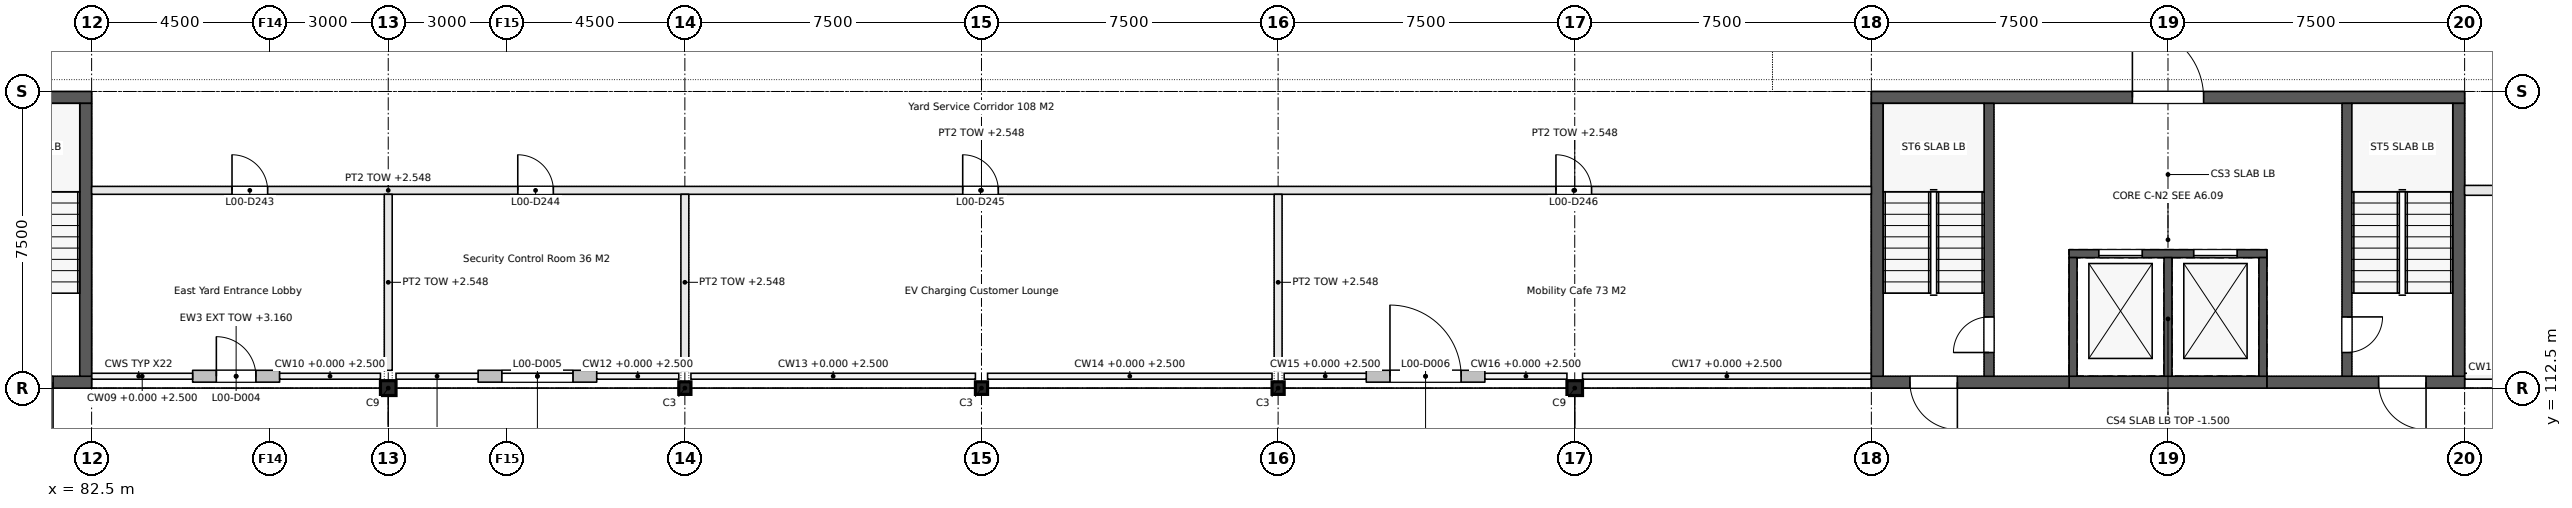
"""IFC4 building model, lengths in metres.
Left out: names, types, materials, properties, quantities, classifications, styles, units other than length and angle.
Written with IfcOpenShell. Run it as: python <this file> out.ifc"""

import sys

from ifc_helpers import new_model, si_unit, direction, frame, frame_2d, origin, origin_2d, place, context, subcontext, project, spatial, rectangle, i_section, extrude, element, fill, save


model = new_model("IFC4")
c1 = context("Model", 3, precision=1e-05, world=origin(), true_north=direction((0.0, 1.0)))
c2 = subcontext(c1, "Body", "Model", "MODEL_VIEW")
j1 = project(units=[si_unit("LENGTHUNIT", "METRE"), si_unit("PLANEANGLEUNIT", "RADIAN")], contexts=[c1])
p1 = place(None, origin())
s1 = spatial("IfcSite", under=j1, at=p1, CompositionType="ELEMENT")
p2 = place(p1, origin())
s2 = spatial("IfcBuilding", under=s1, at=p2, CompositionType="ELEMENT")
p3 = place(p2, origin())
s3 = spatial("IfcBuildingStorey", under=s2, at=p3, CompositionType="ELEMENT", Elevation=0.0)
p4 = place(p3, frame((90.0, 112.5, -0.25), z_axis=(0.0, 0.0, 1.0), x_axis=(1.0, 0.0, 0.0)))
e1 = element("IfcColumn", 1, at=p4, inside=s3, PredefinedType="COLUMN", context=c2, shape_type="SweptSolid", body=[
    extrude(i_section(OverallWidth=0.394, OverallDepth=0.376, WebThickness=0.017, FlangeThickness=0.028, FilletRadius=0.015, at=origin_2d()), origin(), (0.0, 0.0, 1.0), 3.55),
])
for number, where, z_axis, x_axis in (
    (2, (97.5, 112.5, -0.25), (0.0, 0.0, 1.0), (1.0, 0.0, 0.0)),
    (3, (105.0, 112.5, -0.25), (0.0, 0.0, 1.0), (1.0, 0.0, 0.0)),
    (4, (112.5, 112.5, -0.25), (0.0, 0.0, 1.0), (1.0, 0.0, 0.0)),
):
    element("IfcColumn", number, at=place(p3, frame(where, z_axis=z_axis, x_axis=x_axis)), inside=s3, PredefinedType="COLUMN", context=c2, shape_type="SweptSolid", body=[
        extrude(i_section(OverallWidth=0.307, OverallDepth=0.318, WebThickness=0.013, FlangeThickness=0.021, FilletRadius=0.015, at=origin_2d()), origin(), (0.0, 0.0, 1.0), 3.55),
    ])
p5 = place(p3, frame((120.0, 112.5, -0.25), z_axis=(0.0, 0.0, 1.0), x_axis=(1.0, 0.0, 0.0)))
e5 = element("IfcColumn", 5, at=p5, inside=s3, PredefinedType="COLUMN", context=c2, shape_type="SweptSolid", body=[
    extrude(i_section(OverallWidth=0.394, OverallDepth=0.376, WebThickness=0.017, FlangeThickness=0.028, FilletRadius=0.015, at=origin_2d()), origin(), (0.0, 0.0, 1.0), 3.55),
])
p6 = place(p3, frame((82.5, 117.5, 0.0), z_axis=(0.0, 0.0, 1.0), x_axis=(1.0, 0.0, 0.0)))
e6 = element("IfcWall", 6, at=p6, inside=s3, PredefinedType="PARTITIONING", context=c2, shape_type="SweptSolid", body=[
    extrude(rectangle(XDim=45.0, YDim=0.2, at=frame_2d((22.5, 0.0))), origin(), (0.0, 0.0, 1.0), 2.548),
])
p7 = place(p6, frame((3.55, 0.0, 0.0)))
e7 = element("IfcOpeningElement", 7, at=p7, cuts=e6, PredefinedType="OPENING", context=c2, shape_type="SweptSolid", body=[
    extrude(rectangle(XDim=0.9, YDim=2.1, at=frame_2d((0.45, 1.05))), frame((0.0, 0.11, 0.0), z_axis=(0.0, -1.0, 0.0), x_axis=(1.0, 0.0, 0.0)), (0.0, 0.0, 1.0), 0.22),
])
p8 = place(p6, frame((10.775, 0.0, 0.0)))
e8 = element("IfcOpeningElement", 8, at=p8, cuts=e6, PredefinedType="OPENING", context=c2, shape_type="SweptSolid", body=[
    extrude(rectangle(XDim=0.9, YDim=2.1, at=frame_2d((0.45, 1.05))), frame((0.0, 0.11, 0.0), z_axis=(0.0, -1.0, 0.0), x_axis=(1.0, 0.0, 0.0)), (0.0, 0.0, 1.0), 0.22),
])
p9 = place(p6, frame((22.025, 0.0, 0.0)))
e9 = element("IfcOpeningElement", 9, at=p9, cuts=e6, PredefinedType="OPENING", context=c2, shape_type="SweptSolid", body=[
    extrude(rectangle(XDim=0.9, YDim=2.1, at=frame_2d((0.45, 1.05))), frame((0.0, 0.11, 0.0), z_axis=(0.0, -1.0, 0.0), x_axis=(1.0, 0.0, 0.0)), (0.0, 0.0, 1.0), 0.22),
])
p10 = place(p6, frame((37.025, 0.0, 0.0)))
e10 = element("IfcOpeningElement", 10, at=p10, cuts=e6, PredefinedType="OPENING", context=c2, shape_type="SweptSolid", body=[
    extrude(rectangle(XDim=0.9, YDim=2.1, at=frame_2d((0.45, 1.05))), frame((0.0, 0.11, 0.0), z_axis=(0.0, -1.0, 0.0), x_axis=(1.0, 0.0, 0.0)), (0.0, 0.0, 1.0), 0.22),
])
p11 = place(p3, frame((142.5, 117.5, 0.0), z_axis=(0.0, 0.0, 1.0), x_axis=(1.0, 0.0, 0.0)))
e11 = element("IfcWall", 11, at=p11, inside=s3, PredefinedType="PARTITIONING", context=c2, shape_type="SweptSolid", body=[
    extrude(rectangle(XDim=7.5, YDim=0.25, at=frame_2d((3.75, 0.0))), origin(), (0.0, 0.0, 1.0), 2.548),
])
p12 = place(p11, frame((3.3, 0.0, 0.0)))
e12 = element("IfcOpeningElement", 12, at=p12, cuts=e11, PredefinedType="OPENING", context=c2, shape_type="SweptSolid", body=[
    extrude(rectangle(XDim=0.9, YDim=2.1, at=frame_2d((0.45, 1.05))), frame((0.0, 0.135, 0.0), z_axis=(0.0, -1.0, 0.0), x_axis=(1.0, 0.0, 0.0)), (0.0, 0.0, 1.0), 0.27),
])
for number, where, z_axis, x_axis in (
    (13, (90.0, 112.95, 0.0), (0.0, 0.0, 1.0), (0.0, 1.0, 0.0)),
    (14, (97.5, 112.95, 0.0), (0.0, 0.0, 1.0), (0.0, 1.0, 0.0)),
    (15, (112.5, 112.95, 0.0), (0.0, 0.0, 1.0), (0.0, 1.0, 0.0)),
):
    element("IfcWall", number, at=place(p3, frame(where, z_axis=z_axis, x_axis=x_axis)), inside=s3, PredefinedType="PARTITIONING", context=c2, shape_type="SweptSolid", body=[
        extrude(rectangle(XDim=4.45, YDim=0.2, at=frame_2d((2.225, 0.0))), origin(), (0.0, 0.0, 1.0), 2.548),
    ])
p13 = place(p3, frame((85.054, 112.8, 0.0), z_axis=(0.0, 0.0, 1.0), x_axis=(1.0, 0.0, 0.0)))
e16 = element("IfcWall", 16, at=p13, inside=s3, PredefinedType="SOLIDWALL", context=c2, shape_type="SweptSolid", body=[
    extrude(rectangle(XDim=2.2, YDim=0.3, at=frame_2d((1.1, 0.0))), origin(), (0.0, 0.0, 1.0), 3.16),
])
p14 = place(p13, frame((0.6, 0.0, 0.0)))
e17 = element("IfcOpeningElement", 17, at=p14, cuts=e16, PredefinedType="OPENING", context=c2, shape_type="SweptSolid", body=[
    extrude(rectangle(XDim=1.0, YDim=2.1, at=frame_2d((0.5, 1.05))), frame((0.0, 0.16, 0.0), z_axis=(0.0, -1.0, 0.0), x_axis=(1.0, 0.0, 0.0)), (0.0, 0.0, 1.0), 0.32),
])
p15 = place(p3, frame((92.272, 112.8, 0.0), z_axis=(0.0, 0.0, 1.0), x_axis=(1.0, 0.0, 0.0)))
e18 = element("IfcWall", 18, at=p15, inside=s3, PredefinedType="SOLIDWALL", context=c2, shape_type="SweptSolid", body=[
    extrude(rectangle(XDim=3.0, YDim=0.3, at=frame_2d((1.5, 0.0))), origin(), (0.0, 0.0, 1.0), 3.16),
])
p16 = place(p15, frame((0.6, 0.0, 0.0)))
e19 = element("IfcOpeningElement", 19, at=p16, cuts=e18, PredefinedType="OPENING", context=c2, shape_type="SweptSolid", body=[
    extrude(rectangle(XDim=1.8, YDim=2.4, at=frame_2d((0.9, 1.2))), frame((0.0, 0.16, 0.0), z_axis=(0.0, -1.0, 0.0), x_axis=(1.0, 0.0, 0.0)), (0.0, 0.0, 1.0), 0.32),
])
p17 = place(p3, frame((114.728, 112.8, 0.0), z_axis=(0.0, 0.0, 1.0), x_axis=(1.0, 0.0, 0.0)))
e20 = element("IfcWall", 20, at=p17, inside=s3, PredefinedType="SOLIDWALL", context=c2, shape_type="SweptSolid", body=[
    extrude(rectangle(XDim=3.0, YDim=0.3, at=frame_2d((1.5, 0.0))), origin(), (0.0, 0.0, 1.0), 3.16),
])
p18 = place(p17, frame((0.6, 0.0, 0.0)))
e21 = element("IfcOpeningElement", 21, at=p18, cuts=e20, PredefinedType="OPENING", context=c2, shape_type="SweptSolid", body=[
    extrude(rectangle(XDim=1.8, YDim=2.4, at=frame_2d((0.9, 1.2))), frame((0.0, 0.16, 0.0), z_axis=(0.0, -1.0, 0.0), x_axis=(1.0, 0.0, 0.0)), (0.0, 0.0, 1.0), 0.32),
])
p19 = place(p3, frame((67.5, 119.85, 0.0), z_axis=(0.0, 0.0, 1.0), x_axis=(1.0, 0.0, 0.0)))
e22 = element("IfcWall", 22, at=p19, inside=s3, PredefinedType="SHEAR", context=c2, shape_type="SweptSolid", body=[
    extrude(rectangle(XDim=15.0, YDim=0.3, at=frame_2d((7.5, 0.0))), origin(), (0.0, 0.0, 1.0), 3.3),
])
p20 = place(p19, frame((6.6, 0.0, 0.0)))
e23 = element("IfcOpeningElement", 23, at=p20, cuts=e22, PredefinedType="OPENING", context=c2, shape_type="SweptSolid", body=[
    extrude(rectangle(XDim=1.8, YDim=2.1, at=frame_2d((0.9, 1.05))), frame((0.0, 0.16, 0.0), z_axis=(0.0, -1.0, 0.0), x_axis=(1.0, 0.0, 0.0)), (0.0, 0.0, 1.0), 0.32),
])
p21 = place(p3, frame((82.5, 112.65, 0.0), z_axis=(0.0, 0.0, 1.0), x_axis=(-1.0, 0.0, 0.0)))
e24 = element("IfcWall", 24, at=p21, inside=s3, PredefinedType="SHEAR", context=c2, shape_type="SweptSolid", body=[
    extrude(rectangle(XDim=5.0, YDim=0.3, at=frame_2d((2.5, 0.0))), origin(), (0.0, 0.0, 1.0), 3.3),
])
p22 = place(p21, frame((0.975, 0.0, 0.0)))
e25 = element("IfcOpeningElement", 25, at=p22, cuts=e24, PredefinedType="OPENING", context=c2, shape_type="SweptSolid", body=[
    extrude(rectangle(XDim=1.2, YDim=2.1, at=frame_2d((0.6, 1.05))), frame((0.0, 0.16, 0.0), z_axis=(0.0, -1.0, 0.0), x_axis=(1.0, 0.0, 0.0)), (0.0, 0.0, 1.0), 0.32),
])
p23 = place(p3, frame((82.35, 119.7, 0.0), z_axis=(0.0, 0.0, 1.0), x_axis=(0.0, -1.0, 0.0)))
e26 = element("IfcWall", 26, at=p23, inside=s3, PredefinedType="SHEAR", context=c2, shape_type="SweptSolid", body=[
    extrude(rectangle(XDim=6.9, YDim=0.3, at=frame_2d((3.45, 0.0))), origin(), (0.0, 0.0, 1.0), 3.3),
])
p24 = place(p3, frame((127.5, 119.85, 0.0), z_axis=(0.0, 0.0, 1.0), x_axis=(1.0, 0.0, 0.0)))
e27 = element("IfcWall", 27, at=p24, inside=s3, PredefinedType="SHEAR", context=c2, shape_type="SweptSolid", body=[
    extrude(rectangle(XDim=15.0, YDim=0.3, at=frame_2d((7.5, 0.0))), origin(), (0.0, 0.0, 1.0), 3.3),
])
p25 = place(p24, frame((6.6, 0.0, 0.0)))
e28 = element("IfcOpeningElement", 28, at=p25, cuts=e27, PredefinedType="OPENING", context=c2, shape_type="SweptSolid", body=[
    extrude(rectangle(XDim=1.8, YDim=2.1, at=frame_2d((0.9, 1.05))), frame((0.0, 0.16, 0.0), z_axis=(0.0, -1.0, 0.0), x_axis=(1.0, 0.0, 0.0)), (0.0, 0.0, 1.0), 0.32),
])
p26 = place(p3, frame((142.5, 112.65, 0.0), z_axis=(0.0, 0.0, 1.0), x_axis=(-1.0, 0.0, 0.0)))
e29 = element("IfcWall", 29, at=p26, inside=s3, PredefinedType="SHEAR", context=c2, shape_type="SweptSolid", body=[
    extrude(rectangle(XDim=5.0, YDim=0.3, at=frame_2d((2.5, 0.0))), origin(), (0.0, 0.0, 1.0), 3.3),
])
p27 = place(p26, frame((0.975, 0.0, 0.0)))
e30 = element("IfcOpeningElement", 30, at=p27, cuts=e29, PredefinedType="OPENING", context=c2, shape_type="SweptSolid", body=[
    extrude(rectangle(XDim=1.2, YDim=2.1, at=frame_2d((0.6, 1.05))), frame((0.0, 0.16, 0.0), z_axis=(0.0, -1.0, 0.0), x_axis=(1.0, 0.0, 0.0)), (0.0, 0.0, 1.0), 0.32),
])
p28 = place(p3, frame((137.5, 112.65, 0.0), z_axis=(0.0, 0.0, 1.0), x_axis=(-1.0, 0.0, 0.0)))
e31 = element("IfcWall", 31, at=p28, inside=s3, PredefinedType="SHEAR", context=c2, shape_type="SweptSolid", body=[
    extrude(rectangle(XDim=5.0, YDim=0.3, at=frame_2d((2.5, 0.0))), origin(), (0.0, 0.0, 1.0), 3.3),
])
p29 = place(p3, frame((132.5, 112.65, 0.0), z_axis=(0.0, 0.0, 1.0), x_axis=(-1.0, 0.0, 0.0)))
e32 = element("IfcWall", 32, at=p29, inside=s3, PredefinedType="SHEAR", context=c2, shape_type="SweptSolid", body=[
    extrude(rectangle(XDim=5.0, YDim=0.3, at=frame_2d((2.5, 0.0))), origin(), (0.0, 0.0, 1.0), 3.3),
])
p30 = place(p29, frame((2.825, 0.0, 0.0)))
e33 = element("IfcOpeningElement", 33, at=p30, cuts=e32, PredefinedType="OPENING", context=c2, shape_type="SweptSolid", body=[
    extrude(rectangle(XDim=1.2, YDim=2.1, at=frame_2d((0.6, 1.05))), frame((0.0, 0.16, 0.0), z_axis=(0.0, -1.0, 0.0), x_axis=(1.0, 0.0, 0.0)), (0.0, 0.0, 1.0), 0.32),
])
for number, where, z_axis, x_axis in (
    (34, (142.35, 119.7, 0.0), (0.0, 0.0, 1.0), (0.0, -1.0, 0.0)),
    (35, (127.65, 119.7, 0.0), (0.0, 0.0, 1.0), (0.0, -1.0, 0.0)),
):
    element("IfcWall", number, at=place(p3, frame(where, z_axis=z_axis, x_axis=x_axis)), inside=s3, PredefinedType="SHEAR", context=c2, shape_type="SweptSolid", body=[
        extrude(rectangle(XDim=6.9, YDim=0.3, at=frame_2d((3.45, 0.0))), origin(), (0.0, 0.0, 1.0), 3.3),
    ])
p31 = place(p3, frame((139.525, 119.7, 0.0), z_axis=(0.0, 0.0, 1.0), x_axis=(0.0, -1.0, 0.0)))
e36 = element("IfcWall", 36, at=p31, inside=s3, PredefinedType="STANDARD", context=c2, shape_type="SweptSolid", body=[
    extrude(rectangle(XDim=6.9, YDim=0.25, at=frame_2d((3.45, 0.0))), origin(), (0.0, 0.0, 1.0), 3.1),
])
p32 = place(p31, frame((5.4, 0.0, 0.0)))
e37 = element("IfcOpeningElement", 37, at=p32, cuts=e36, PredefinedType="OPENING", context=c2, shape_type="SweptSolid", body=[
    extrude(rectangle(XDim=0.9, YDim=2.1, at=frame_2d((0.45, 1.05))), frame((0.0, 0.135, 0.0), z_axis=(0.0, -1.0, 0.0), x_axis=(1.0, 0.0, 0.0)), (0.0, 0.0, 1.0), 0.27),
])
p33 = place(p3, frame((130.475, 112.8, 0.0), z_axis=(0.0, 0.0, 1.0), x_axis=(0.0, 1.0, 0.0)))
e38 = element("IfcWall", 38, at=p33, inside=s3, PredefinedType="STANDARD", context=c2, shape_type="SweptSolid", body=[
    extrude(rectangle(XDim=6.9, YDim=0.25, at=frame_2d((3.45, 0.0))), origin(), (0.0, 0.0, 1.0), 3.1),
])
p34 = place(p33, frame((0.6, 0.0, 0.0)))
e39 = element("IfcOpeningElement", 39, at=p34, cuts=e38, PredefinedType="OPENING", context=c2, shape_type="SweptSolid", body=[
    extrude(rectangle(XDim=0.9, YDim=2.1, at=frame_2d((0.45, 1.05))), frame((0.0, 0.135, 0.0), z_axis=(0.0, -1.0, 0.0), x_axis=(1.0, 0.0, 0.0)), (0.0, 0.0, 1.0), 0.27),
])
p35 = place(p3, frame((137.5, 115.9, 0.0), z_axis=(0.0, 0.0, 1.0), x_axis=(-1.0, 0.0, 0.0)))
e40 = element("IfcWall", 40, at=p35, inside=s3, PredefinedType="STANDARD", context=c2, shape_type="SweptSolid", body=[
    extrude(rectangle(XDim=5.0, YDim=0.2, at=frame_2d((2.5, 0.0))), origin(), (0.0, 0.0, 1.0), 3.1),
])
p36 = place(p35, frame((0.75, 0.0, 0.0)))
e41 = element("IfcOpeningElement", 41, at=p36, cuts=e40, PredefinedType="OPENING", context=c2, shape_type="SweptSolid", body=[
    extrude(rectangle(XDim=1.1, YDim=2.1, at=frame_2d((0.55, 1.05))), frame((0.0, 0.11, 0.0), z_axis=(0.0, -1.0, 0.0), x_axis=(1.0, 0.0, 0.0)), (0.0, 0.0, 1.0), 0.22),
])
p37 = place(p35, frame((3.15, 0.0, 0.0)))
e42 = element("IfcOpeningElement", 42, at=p37, cuts=e40, PredefinedType="OPENING", context=c2, shape_type="SweptSolid", body=[
    extrude(rectangle(XDim=1.1, YDim=2.1, at=frame_2d((0.55, 1.05))), frame((0.0, 0.11, 0.0), z_axis=(0.0, -1.0, 0.0), x_axis=(1.0, 0.0, 0.0)), (0.0, 0.0, 1.0), 0.22),
])
for number, where, z_axis, x_axis in (
    (43, (137.4, 115.8, 0.0), (0.0, 0.0, 1.0), (0.0, -1.0, 0.0)),
    (44, (135.0, 115.8, 0.0), (0.0, 0.0, 1.0), (0.0, -1.0, 0.0)),
    (45, (132.6, 115.8, 0.0), (0.0, 0.0, 1.0), (0.0, -1.0, 0.0)),
):
    element("IfcWall", number, at=place(p3, frame(where, z_axis=z_axis, x_axis=x_axis)), inside=s3, PredefinedType="STANDARD", context=c2, shape_type="SweptSolid", body=[
        extrude(rectangle(XDim=3.0, YDim=0.2, at=frame_2d((1.5, 0.0))), origin(), (0.0, 0.0, 1.0), 3.1),
    ])
p38 = place(p3, frame((137.5, 115.9, -1.5), z_axis=(0.0, 0.0, 1.0), x_axis=(-1.0, 0.0, 0.0)))
e46 = element("IfcWall", 46, at=p38, inside=s3, PredefinedType="STANDARD", context=c2, shape_type="SweptSolid", body=[
    extrude(rectangle(XDim=5.0, YDim=0.2, at=frame_2d((2.5, 0.0))), origin(), (0.0, 0.0, 1.0), 1.3),
])
for number, where, z_axis, x_axis in (
    (47, (137.4, 115.8, -1.5), (0.0, 0.0, 1.0), (0.0, -1.0, 0.0)),
    (48, (135.0, 115.8, -1.5), (0.0, 0.0, 1.0), (0.0, -1.0, 0.0)),
    (49, (132.6, 115.8, -1.5), (0.0, 0.0, 1.0), (0.0, -1.0, 0.0)),
):
    element("IfcWall", number, at=place(p3, frame(where, z_axis=z_axis, x_axis=x_axis)), inside=s3, PredefinedType="STANDARD", context=c2, shape_type="SweptSolid", body=[
        extrude(rectangle(XDim=3.0, YDim=0.2, at=frame_2d((1.5, 0.0))), origin(), (0.0, 0.0, 1.0), 1.3),
    ])
p39 = place(p3, frame((137.5, 112.65, -1.5), z_axis=(0.0, 0.0, 1.0), x_axis=(-1.0, 0.0, 0.0)))
e50 = element("IfcWall", 50, at=p39, inside=s3, PredefinedType="SHEAR", context=c2, shape_type="SweptSolid", body=[
    extrude(rectangle(XDim=5.0, YDim=0.3, at=frame_2d((2.5, 0.0))), origin(), (0.0, 0.0, 1.0), 1.3),
])
p40 = place(p7, origin())
e51 = element("IfcDoor", 51, at=p40, inside=s3, OperationType="SINGLE_SWING_LEFT", PredefinedType="DOOR", context=c2, shape_type="SweptSolid", body=[
    extrude(rectangle(XDim=0.9, YDim=2.1, at=frame_2d((0.45, 1.05))), frame((0.0, 0.025, 0.0), z_axis=(0.0, -1.0, 0.0), x_axis=(1.0, 0.0, 0.0)), (0.0, 0.0, 1.0), 0.05),
])
fill(e7, e51)
p41 = place(p8, origin())
e52 = element("IfcDoor", 52, at=p41, inside=s3, OperationType="SINGLE_SWING_LEFT", PredefinedType="DOOR", context=c2, shape_type="SweptSolid", body=[
    extrude(rectangle(XDim=0.9, YDim=2.1, at=frame_2d((0.45, 1.05))), frame((0.0, 0.025, 0.0), z_axis=(0.0, -1.0, 0.0), x_axis=(1.0, 0.0, 0.0)), (0.0, 0.0, 1.0), 0.05),
])
fill(e8, e52)
p42 = place(p9, origin())
e53 = element("IfcDoor", 53, at=p42, inside=s3, OperationType="SINGLE_SWING_LEFT", PredefinedType="DOOR", context=c2, shape_type="SweptSolid", body=[
    extrude(rectangle(XDim=0.9, YDim=2.1, at=frame_2d((0.45, 1.05))), frame((0.0, 0.025, 0.0), z_axis=(0.0, -1.0, 0.0), x_axis=(1.0, 0.0, 0.0)), (0.0, 0.0, 1.0), 0.05),
])
fill(e9, e53)
p43 = place(p10, origin())
e54 = element("IfcDoor", 54, at=p43, inside=s3, OperationType="SINGLE_SWING_RIGHT", PredefinedType="DOOR", context=c2, shape_type="SweptSolid", body=[
    extrude(rectangle(XDim=0.9, YDim=2.1, at=frame_2d((0.45, 1.05))), frame((0.0, 0.025, 0.0), z_axis=(0.0, -1.0, 0.0), x_axis=(1.0, 0.0, 0.0)), (0.0, 0.0, 1.0), 0.05),
])
fill(e10, e54)
p44 = place(p14, origin())
e55 = element("IfcDoor", 55, at=p44, inside=s3, OperationType="SINGLE_SWING_RIGHT", PredefinedType="DOOR", context=c2, shape_type="SweptSolid", body=[
    extrude(rectangle(XDim=1.0, YDim=2.1, at=frame_2d((0.5, 1.05))), frame((0.0, 0.025, 0.0), z_axis=(0.0, -1.0, 0.0), x_axis=(1.0, 0.0, 0.0)), (0.0, 0.0, 1.0), 0.05),
])
fill(e17, e55)
p45 = place(p16, origin())
e56 = element("IfcDoor", 56, at=p45, inside=s3, OperationType="DOUBLE_DOOR_SLIDING", PredefinedType="DOOR", context=c2, shape_type="SweptSolid", body=[
    extrude(rectangle(XDim=1.8, YDim=2.4, at=frame_2d((0.9, 1.2))), frame((0.0, 0.025, 0.0), z_axis=(0.0, -1.0, 0.0), x_axis=(1.0, 0.0, 0.0)), (0.0, 0.0, 1.0), 0.05),
])
fill(e19, e56)
p46 = place(p18, origin())
e57 = element("IfcDoor", 57, at=p46, inside=s3, OperationType="DOUBLE_DOOR_DOUBLE_SWING", PredefinedType="DOOR", context=c2, shape_type="SweptSolid", body=[
    extrude(rectangle(XDim=1.8, YDim=2.4, at=frame_2d((0.9, 1.2))), frame((0.0, 0.025, 0.0), z_axis=(0.0, -1.0, 0.0), x_axis=(1.0, 0.0, 0.0)), (0.0, 0.0, 1.0), 0.05),
])
fill(e21, e57)
p47 = place(p22, origin())
e58 = element("IfcDoor", 58, at=p47, inside=s3, OperationType="SINGLE_SWING_LEFT", PredefinedType="DOOR", context=c2, shape_type="SweptSolid", body=[
    extrude(rectangle(XDim=1.2, YDim=2.1, at=frame_2d((0.6, 1.05))), frame((0.0, 0.025, 0.0), z_axis=(0.0, -1.0, 0.0), x_axis=(1.0, 0.0, 0.0)), (0.0, 0.0, 1.0), 0.05),
])
fill(e25, e58)
p48 = place(p25, origin())
e59 = element("IfcDoor", 59, at=p48, inside=s3, OperationType="DOUBLE_DOOR_SINGLE_SWING", PredefinedType="DOOR", context=c2, shape_type="SweptSolid", body=[
    extrude(rectangle(XDim=1.8, YDim=2.1, at=frame_2d((0.9, 1.05))), frame((0.0, 0.025, 0.0), z_axis=(0.0, -1.0, 0.0), x_axis=(1.0, 0.0, 0.0)), (0.0, 0.0, 1.0), 0.05),
])
fill(e28, e59)
p49 = place(p32, origin())
e60 = element("IfcDoor", 60, at=p49, inside=s3, OperationType="SINGLE_SWING_LEFT", PredefinedType="DOOR", context=c2, shape_type="SweptSolid", body=[
    extrude(rectangle(XDim=0.9, YDim=2.1, at=frame_2d((0.45, 1.05))), frame((0.0, 0.025, 0.0), z_axis=(0.0, -1.0, 0.0), x_axis=(1.0, 0.0, 0.0)), (0.0, 0.0, 1.0), 0.05),
])
fill(e37, e60)
p50 = place(p34, origin())
e61 = element("IfcDoor", 61, at=p50, inside=s3, OperationType="SINGLE_SWING_RIGHT", PredefinedType="DOOR", context=c2, shape_type="SweptSolid", body=[
    extrude(rectangle(XDim=0.9, YDim=2.1, at=frame_2d((0.45, 1.05))), frame((0.0, 0.025, 0.0), z_axis=(0.0, -1.0, 0.0), x_axis=(1.0, 0.0, 0.0)), (0.0, 0.0, 1.0), 0.05),
])
fill(e39, e61)
p51 = place(p36, origin())
e62 = element("IfcDoor", 62, at=p51, inside=s3, OperationType="DOUBLE_DOOR_SLIDING", PredefinedType="DOOR", context=c2, shape_type="SweptSolid", body=[
    extrude(rectangle(XDim=1.1, YDim=2.1, at=frame_2d((0.55, 1.05))), frame((0.0, 0.025, 0.0), z_axis=(0.0, -1.0, 0.0), x_axis=(1.0, 0.0, 0.0)), (0.0, 0.0, 1.0), 0.05),
])
fill(e41, e62)
p52 = place(p37, origin())
e63 = element("IfcDoor", 63, at=p52, inside=s3, OperationType="DOUBLE_DOOR_SLIDING", PredefinedType="DOOR", context=c2, shape_type="SweptSolid", body=[
    extrude(rectangle(XDim=1.1, YDim=2.1, at=frame_2d((0.55, 1.05))), frame((0.0, 0.025, 0.0), z_axis=(0.0, -1.0, 0.0), x_axis=(1.0, 0.0, 0.0)), (0.0, 0.0, 1.0), 0.05),
])
fill(e42, e63)
p53 = place(p27, origin())
e64 = element("IfcDoor", 64, at=p53, inside=s3, OperationType="SINGLE_SWING_LEFT", PredefinedType="DOOR", context=c2, shape_type="SweptSolid", body=[
    extrude(rectangle(XDim=1.2, YDim=2.1, at=frame_2d((0.6, 1.05))), frame((0.0, 0.025, 0.0), z_axis=(0.0, -1.0, 0.0), x_axis=(1.0, 0.0, 0.0)), (0.0, 0.0, 1.0), 0.05),
])
fill(e30, e64)
p54 = place(p30, origin())
e65 = element("IfcDoor", 65, at=p54, inside=s3, OperationType="SINGLE_SWING_RIGHT", PredefinedType="DOOR", context=c2, shape_type="SweptSolid", body=[
    extrude(rectangle(XDim=1.2, YDim=2.1, at=frame_2d((0.6, 1.05))), frame((0.0, 0.025, 0.0), z_axis=(0.0, -1.0, 0.0), x_axis=(1.0, 0.0, 0.0)), (0.0, 0.0, 1.0), 0.05),
])
fill(e33, e65)
save(model, sys.argv[1])
